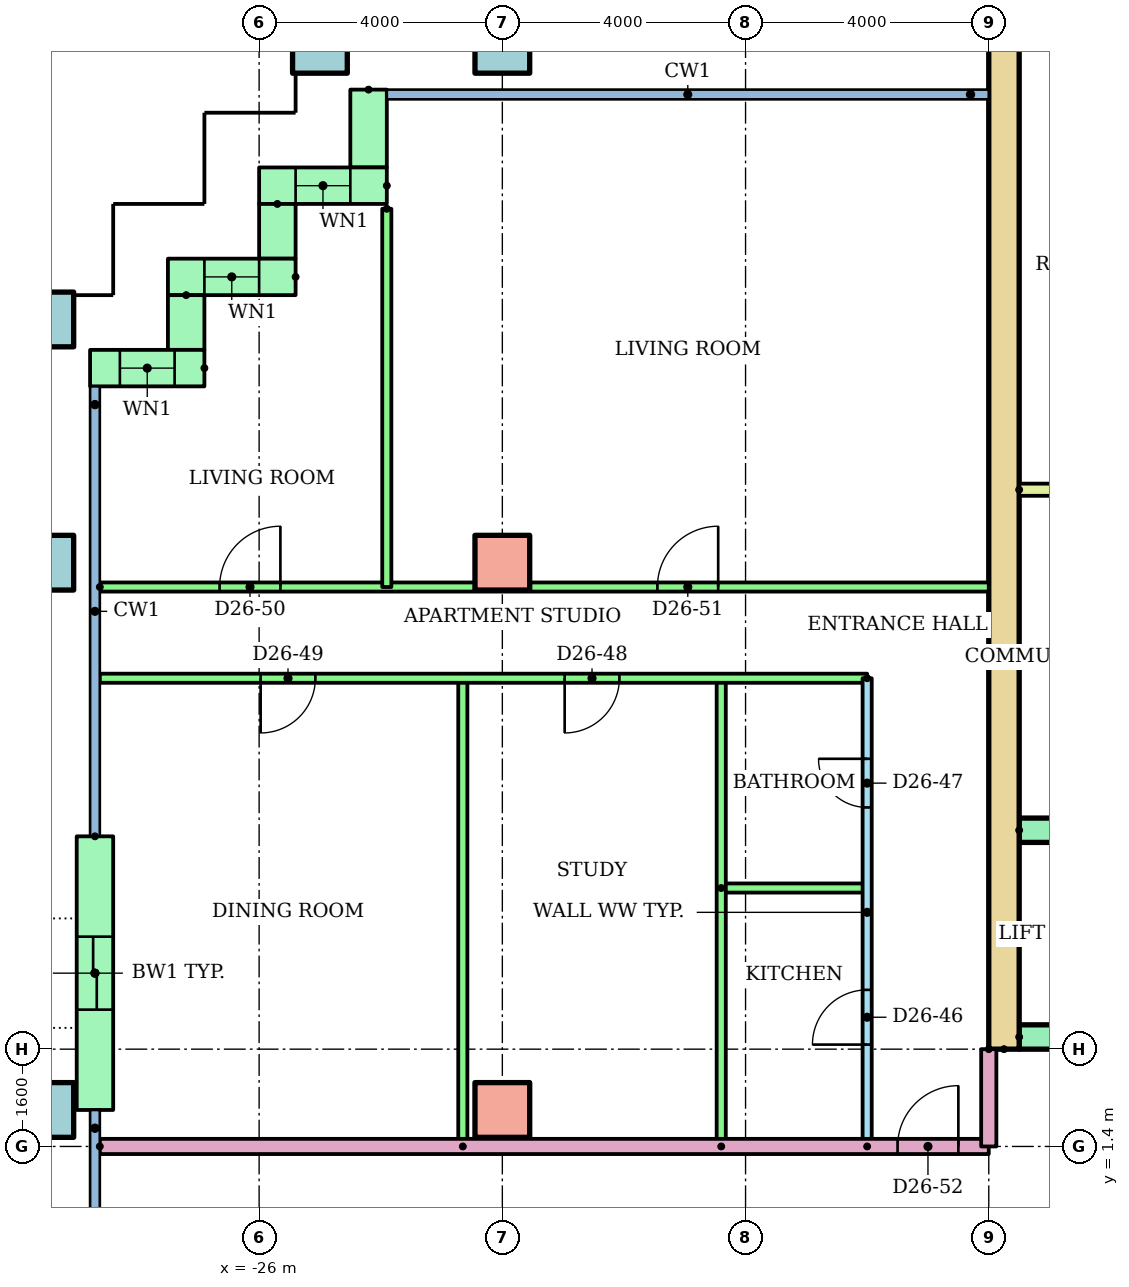
"""IFC4 building model, lengths in metres.
Left out: names, types, materials, properties, quantities, classifications, styles, units other than length and angle.
Written with IfcOpenShell. Run it as: python <this file> out.ifc"""

import sys

from ifc_helpers import new_model, si_unit, direction, frame, frame_2d, origin, origin_2d, place, context, subcontext, project, spatial, rectangle, hollow_rectangle, extrude, element, fill, save


model = new_model("IFC4")
c1 = context("Model", 3, precision=1e-05, world=origin(), true_north=direction((0.0, 1.0)))
c2 = subcontext(c1, "Body", "Model", "MODEL_VIEW")
j1 = project(units=[si_unit("LENGTHUNIT", "METRE"), si_unit("PLANEANGLEUNIT", "RADIAN")], contexts=[c1])
p1 = place(None, origin())
s1 = spatial("IfcSite", under=j1, at=p1, CompositionType="ELEMENT")
p2 = place(p1, origin())
s2 = spatial("IfcBuilding", under=s1, at=p2, CompositionType="ELEMENT")
p3 = place(p2, frame((0.0, 0.0, 99.9)))
s3 = spatial("IfcBuildingStorey", under=s2, at=p3, CompositionType="ELEMENT", Elevation=99.9)
p4 = place(p3, frame((-29.5, 2.0, 0.0)))
e1 = element("IfcColumn", 1, at=p4, inside=s3, PredefinedType="COLUMN", context=c2, shape_type="SweptSolid", body=[
    extrude(hollow_rectangle(XDim=0.9, YDim=0.9, WallThickness=0.045, at=origin_2d()), origin(), (0.0, 0.0, 1.0), 3.2),
])
p5 = place(p3, frame((-22.0, 2.0, 0.0)))
e2 = element("IfcColumn", 2, at=p5, inside=s3, PredefinedType="COLUMN", context=c2, shape_type="SweptSolid", body=[
    extrude(rectangle(XDim=0.9, YDim=0.9, at=origin_2d()), origin(), (0.0, 0.0, 1.0), 3.2),
])
p6 = place(p3, frame((-29.5, 11.0, 0.0)))
e3 = element("IfcColumn", 3, at=p6, inside=s3, PredefinedType="COLUMN", context=c2, shape_type="SweptSolid", body=[
    extrude(hollow_rectangle(XDim=0.9, YDim=0.9, WallThickness=0.045, at=origin_2d()), origin(), (0.0, 0.0, 1.0), 3.2),
])
p7 = place(p3, frame((-22.0, 11.0, 0.0)))
e4 = element("IfcColumn", 4, at=p7, inside=s3, PredefinedType="COLUMN", context=c2, shape_type="SweptSolid", body=[
    extrude(rectangle(XDim=0.9, YDim=0.9, at=origin_2d()), origin(), (0.0, 0.0, 1.0), 3.2),
])
for number, where in (
    (5, (-29.5, 15.0, 0.0)),
    (6, (-25.0, 19.5, 0.0)),
    (7, (-22.0, 19.5, 0.0)),
):
    element("IfcColumn", number, at=place(p3, frame(where)), inside=s3, PredefinedType="COLUMN", context=c2, shape_type="SweptSolid", body=[
        extrude(hollow_rectangle(XDim=0.9, YDim=0.9, WallThickness=0.045, at=origin_2d()), origin(), (0.0, 0.0, 1.0), 3.2),
    ])
p8 = place(p3, frame((-24.2, 18.78, 0.0), z_axis=(0.0, 0.0, 1.0), x_axis=(0.0, -1.0, 0.0)))
e8 = element("IfcWall", 8, at=p8, inside=s3, PredefinedType="STANDARD", context=c2, shape_type="SweptSolid", body=[
    extrude(rectangle(XDim=1.28, YDim=0.6, at=frame_2d((0.64, 0.0))), origin(), (0.0, 0.0, 1.0), 2.92),
])
p9 = place(p3, frame((-23.9, 17.2, 0.0), z_axis=(0.0, 0.0, 1.0), x_axis=(-1.0, 0.0, 0.0)))
e9 = element("IfcWall", 9, at=p9, inside=s3, PredefinedType="STANDARD", context=c2, shape_type="SweptSolid", body=[
    extrude(rectangle(XDim=2.1, YDim=0.6, at=frame_2d((1.05, 0.0))), origin(), (0.0, 0.0, 1.0), 2.92),
])
p10 = place(p9, frame((0.6, 0.0, 0.9)))
e10 = element("IfcOpeningElement", 10, at=p10, cuts=e9, PredefinedType="OPENING", context=c2, shape_type="SweptSolid", body=[
    extrude(rectangle(XDim=0.9, YDim=1.5, at=frame_2d((0.45, 0.75))), frame((0.0, 0.31, 0.0), z_axis=(0.0, -1.0, 0.0), x_axis=(1.0, 0.0, 0.0)), (0.0, 0.0, 1.0), 0.62),
])
p11 = place(p3, frame((-25.7, 16.9, 0.0), z_axis=(0.0, 0.0, 1.0), x_axis=(0.0, -1.0, 0.0)))
e11 = element("IfcWall", 11, at=p11, inside=s3, PredefinedType="STANDARD", context=c2, shape_type="SweptSolid", body=[
    extrude(rectangle(XDim=0.9, YDim=0.6, at=frame_2d((0.45, 0.0))), origin(), (0.0, 0.0, 1.0), 2.92),
])
p12 = place(p3, frame((-25.4, 15.7, 0.0), z_axis=(0.0, 0.0, 1.0), x_axis=(-1.0, 0.0, 0.0)))
e12 = element("IfcWall", 12, at=p12, inside=s3, PredefinedType="STANDARD", context=c2, shape_type="SweptSolid", body=[
    extrude(rectangle(XDim=2.1, YDim=0.6, at=frame_2d((1.05, 0.0))), origin(), (0.0, 0.0, 1.0), 2.92),
])
p13 = place(p12, frame((0.6, 0.0, 0.9)))
e13 = element("IfcOpeningElement", 13, at=p13, cuts=e12, PredefinedType="OPENING", context=c2, shape_type="SweptSolid", body=[
    extrude(rectangle(XDim=0.9, YDim=1.5, at=frame_2d((0.45, 0.75))), frame((0.0, 0.31, 0.0), z_axis=(0.0, -1.0, 0.0), x_axis=(1.0, 0.0, 0.0)), (0.0, 0.0, 1.0), 0.62),
])
p14 = place(p3, frame((-27.2, 15.4, 0.0), z_axis=(0.0, 0.0, 1.0), x_axis=(0.0, -1.0, 0.0)))
e14 = element("IfcWall", 14, at=p14, inside=s3, PredefinedType="STANDARD", context=c2, shape_type="SweptSolid", body=[
    extrude(rectangle(XDim=0.9, YDim=0.6, at=frame_2d((0.45, 0.0))), origin(), (0.0, 0.0, 1.0), 2.92),
])
p15 = place(p3, frame((-26.9, 14.2, 0.0), z_axis=(0.0, 0.0, 1.0), x_axis=(-1.0, 0.0, 0.0)))
e15 = element("IfcWall", 15, at=p15, inside=s3, PredefinedType="STANDARD", context=c2, shape_type="SweptSolid", body=[
    extrude(rectangle(XDim=1.88, YDim=0.6, at=frame_2d((0.94, 0.0))), origin(), (0.0, 0.0, 1.0), 2.92),
])
p16 = place(p15, frame((0.49, 0.0, 0.9)))
e16 = element("IfcOpeningElement", 16, at=p16, cuts=e15, PredefinedType="OPENING", context=c2, shape_type="SweptSolid", body=[
    extrude(rectangle(XDim=0.9, YDim=1.5, at=frame_2d((0.45, 0.75))), frame((0.0, 0.31, 0.0), z_axis=(0.0, -1.0, 0.0), x_axis=(1.0, 0.0, 0.0)), (0.0, 0.0, 1.0), 0.62),
])
p17 = place(p3, frame((-28.7, 6.5, 0.0), z_axis=(0.0, 0.0, 1.0), x_axis=(0.0, -1.0, 0.0)))
e17 = element("IfcWall", 17, at=p17, inside=s3, PredefinedType="STANDARD", context=c2, shape_type="SweptSolid", body=[
    extrude(rectangle(XDim=4.5, YDim=0.6, at=frame_2d((2.25, 0.0))), origin(), (0.0, 0.0, 1.0), 2.92),
])
p18 = place(p17, frame((1.65, 0.0, 0.0)))
e18 = element("IfcOpeningElement", 18, at=p18, cuts=e17, PredefinedType="OPENING", context=c2, shape_type="SweptSolid", body=[
    extrude(rectangle(XDim=1.2, YDim=2.1, at=frame_2d((0.6, 1.05))), frame((0.0, 0.31, 0.0), z_axis=(0.0, -1.0, 0.0), x_axis=(1.0, 0.0, 0.0)), (0.0, 0.0, 1.0), 0.62),
])
p19 = place(p3, frame((-13.75, 3.0, 0.0), z_axis=(0.0, 0.0, 1.0), x_axis=(0.0, 1.0, 0.0)))
e19 = element("IfcWall", 19, at=p19, inside=s3, PredefinedType="SHEAR", context=c2, shape_type="SweptSolid", body=[
    extrude(rectangle(XDim=17.0, YDim=0.5, at=frame_2d((8.5, 0.0))), origin(), (0.0, 0.0, 1.0), 2.92),
])
p20 = place(p3, frame((-13.5, 3.2, 0.0)))
e20 = element("IfcWall", 20, at=p20, inside=s3, PredefinedType="SHEAR", context=c2, shape_type="SweptSolid", body=[
    extrude(rectangle(XDim=27.0, YDim=0.4, at=frame_2d((13.5, 0.0))), origin(), (0.0, 0.0, 1.0), 2.92),
])
p21 = place(p20, frame((6.861, 0.0, 0.0)))
e21 = element("IfcOpeningElement", 21, at=p21, cuts=e20, PredefinedType="OPENING", context=c2, shape_type="SweptSolid", body=[
    extrude(rectangle(XDim=1.1, YDim=2.1, at=frame_2d((0.55, 1.05))), frame((0.0, 0.21, 0.0), z_axis=(0.0, -1.0, 0.0), x_axis=(1.0, 0.0, 0.0)), (0.0, 0.0, 1.0), 0.42),
])
p22 = place(p20, frame((9.906, 0.0, 0.0)))
e22 = element("IfcOpeningElement", 22, at=p22, cuts=e20, PredefinedType="OPENING", context=c2, shape_type="SweptSolid", body=[
    extrude(rectangle(XDim=1.1, YDim=2.1, at=frame_2d((0.55, 1.05))), frame((0.0, 0.21, 0.0), z_axis=(0.0, -1.0, 0.0), x_axis=(1.0, 0.0, 0.0)), (0.0, 0.0, 1.0), 0.42),
])
p23 = place(p20, frame((15.994, 0.0, 0.0)))
e23 = element("IfcOpeningElement", 23, at=p23, cuts=e20, PredefinedType="OPENING", context=c2, shape_type="SweptSolid", body=[
    extrude(rectangle(XDim=1.1, YDim=2.1, at=frame_2d((0.55, 1.05))), frame((0.0, 0.21, 0.0), z_axis=(0.0, -1.0, 0.0), x_axis=(1.0, 0.0, 0.0)), (0.0, 0.0, 1.0), 0.42),
])
p24 = place(p20, frame((19.039, 0.0, 0.0)))
e24 = element("IfcOpeningElement", 24, at=p24, cuts=e20, PredefinedType="OPENING", context=c2, shape_type="SweptSolid", body=[
    extrude(rectangle(XDim=1.1, YDim=2.1, at=frame_2d((0.55, 1.05))), frame((0.0, 0.21, 0.0), z_axis=(0.0, -1.0, 0.0), x_axis=(1.0, 0.0, 0.0)), (0.0, 0.0, 1.0), 0.42),
])
p25 = place(p20, frame((12.6, 0.0, 0.0)))
e25 = element("IfcOpeningElement", 25, at=p25, cuts=e20, PredefinedType="OPENING", context=c2, shape_type="SweptSolid", body=[
    extrude(rectangle(XDim=1.8, YDim=2.1, at=frame_2d((0.9, 1.05))), frame((0.0, 0.21, 0.0), z_axis=(0.0, -1.0, 0.0), x_axis=(1.0, 0.0, 0.0)), (0.0, 0.0, 1.0), 0.42),
])
p26 = place(p3, frame((-13.5, 6.6, 0.0)))
e26 = element("IfcWall", 26, at=p26, inside=s3, PredefinedType="SHEAR", context=c2, shape_type="SweptSolid", body=[
    extrude(rectangle(XDim=11.978, YDim=0.4, at=frame_2d((5.989, 0.0))), origin(), (0.0, 0.0, 1.0), 2.92),
])
p27 = place(p3, frame((-13.5, 12.2, 0.0)))
e27 = element("IfcWall", 27, at=p27, inside=s3, PredefinedType="PARTITIONING", context=c2, shape_type="SweptSolid", body=[
    extrude(rectangle(XDim=3.9, YDim=0.2, at=frame_2d((1.95, 0.0))), origin(), (0.0, 0.0, 1.0), 2.92),
])
p28 = place(p3, frame((-16.0, 1.4, 0.0), z_axis=(0.0, 0.0, 1.0), x_axis=(0.0, 1.0, 0.0)))
e28 = element("IfcWall", 28, at=p28, inside=s3, PredefinedType="PARTITIONING", context=c2, shape_type="SweptSolid", body=[
    extrude(rectangle(XDim=7.7, YDim=0.15, at=frame_2d((3.85, 0.0))), origin(), (0.0, 0.0, 1.0), 2.4),
])
p29 = place(p28, frame((1.675, 0.0, 0.0)))
e29 = element("IfcOpeningElement", 29, at=p29, cuts=e28, PredefinedType="OPENING", context=c2, shape_type="SweptSolid", body=[
    extrude(rectangle(XDim=0.9, YDim=2.1, at=frame_2d((0.45, 1.05))), frame((0.0, 0.085, 0.0), z_axis=(0.0, -1.0, 0.0), x_axis=(1.0, 0.0, 0.0)), (0.0, 0.0, 1.0), 0.17),
])
p30 = place(p28, frame((5.575, 0.0, 0.0)))
e30 = element("IfcOpeningElement", 30, at=p30, cuts=e28, PredefinedType="OPENING", context=c2, shape_type="SweptSolid", body=[
    extrude(rectangle(XDim=0.8, YDim=2.1, at=frame_2d((0.4, 1.05))), frame((0.0, 0.085, 0.0), z_axis=(0.0, -1.0, 0.0), x_axis=(1.0, 0.0, 0.0)), (0.0, 0.0, 1.0), 0.17),
])
p31 = place(p3, frame((-18.4, 5.65, 0.0)))
e31 = element("IfcWall", 31, at=p31, inside=s3, PredefinedType="PARTITIONING", context=c2, shape_type="SweptSolid", body=[
    extrude(rectangle(XDim=2.4, YDim=0.15, at=frame_2d((1.2, 0.0))), origin(), (0.0, 0.0, 1.0), 2.4),
])
for number, where, z_axis, x_axis in (
    (32, (-18.4, 1.4, 0.0), (0.0, 0.0, 1.0), (0.0, 1.0, 0.0)),
    (33, (-22.65, 1.4, 0.0), (0.0, 0.0, 1.0), (0.0, 1.0, 0.0)),
):
    element("IfcWall", number, at=place(p3, frame(where, z_axis=z_axis, x_axis=x_axis)), inside=s3, PredefinedType="PARTITIONING", context=c2, shape_type="SweptSolid", body=[
        extrude(rectangle(XDim=7.7, YDim=0.15, at=frame_2d((3.85, 0.0))), origin(), (0.0, 0.0, 1.0), 2.4),
    ])
p32 = place(p3, frame((-16.0, 9.1, 0.0), z_axis=(0.0, 0.0, 1.0), x_axis=(-1.0, 0.0, 0.0)))
e34 = element("IfcWall", 34, at=p32, inside=s3, PredefinedType="PARTITIONING", context=c2, shape_type="SweptSolid", body=[
    extrude(rectangle(XDim=12.62, YDim=0.15, at=frame_2d((6.31, 0.0))), origin(), (0.0, 0.0, 1.0), 2.4),
])
p33 = place(p32, frame((4.075, 0.0, 0.0)))
e35 = element("IfcOpeningElement", 35, at=p33, cuts=e34, PredefinedType="OPENING", context=c2, shape_type="SweptSolid", body=[
    extrude(rectangle(XDim=0.9, YDim=2.1, at=frame_2d((0.45, 1.05))), frame((0.0, 0.085, 0.0), z_axis=(0.0, -1.0, 0.0), x_axis=(1.0, 0.0, 0.0)), (0.0, 0.0, 1.0), 0.17),
])
p34 = place(p32, frame((9.075, 0.0, 0.0)))
e36 = element("IfcOpeningElement", 36, at=p34, cuts=e34, PredefinedType="OPENING", context=c2, shape_type="SweptSolid", body=[
    extrude(rectangle(XDim=0.9, YDim=2.1, at=frame_2d((0.45, 1.05))), frame((0.0, 0.085, 0.0), z_axis=(0.0, -1.0, 0.0), x_axis=(1.0, 0.0, 0.0)), (0.0, 0.0, 1.0), 0.17),
])
p35 = place(p3, frame((-28.62, 10.6, 0.0)))
e37 = element("IfcWall", 37, at=p35, inside=s3, PredefinedType="PARTITIONING", context=c2, shape_type="SweptSolid", body=[
    extrude(rectangle(XDim=14.62, YDim=0.15, at=frame_2d((7.31, 0.0))), origin(), (0.0, 0.0, 1.0), 2.4),
])
p36 = place(p35, frame((1.97, 0.0, 0.0)))
e38 = element("IfcOpeningElement", 38, at=p36, cuts=e37, PredefinedType="OPENING", context=c2, shape_type="SweptSolid", body=[
    extrude(rectangle(XDim=1.0, YDim=2.1, at=frame_2d((0.5, 1.05))), frame((0.0, 0.085, 0.0), z_axis=(0.0, -1.0, 0.0), x_axis=(1.0, 0.0, 0.0)), (0.0, 0.0, 1.0), 0.17),
])
p37 = place(p35, frame((9.17, 0.0, 0.0)))
e39 = element("IfcOpeningElement", 39, at=p37, cuts=e37, PredefinedType="OPENING", context=c2, shape_type="SweptSolid", body=[
    extrude(rectangle(XDim=1.0, YDim=2.1, at=frame_2d((0.5, 1.05))), frame((0.0, 0.085, 0.0), z_axis=(0.0, -1.0, 0.0), x_axis=(1.0, 0.0, 0.0)), (0.0, 0.0, 1.0), 0.17),
])
p38 = place(p3, frame((-23.9, 16.82, 0.0), z_axis=(0.0, 0.0, 1.0), x_axis=(0.0, -1.0, 0.0)))
e40 = element("IfcWall", 40, at=p38, inside=s3, PredefinedType="PARTITIONING", context=c2, shape_type="SweptSolid", body=[
    extrude(rectangle(XDim=6.22, YDim=0.15, at=frame_2d((3.11, 0.0))), origin(), (0.0, 0.0, 1.0), 2.4),
])
p39 = place(p3, frame((-28.62, 1.4, 0.0)))
e41 = element("IfcWall", 41, at=p39, inside=s3, PredefinedType="PARTITIONING", context=c2, shape_type="SweptSolid", body=[
    extrude(rectangle(XDim=14.62, YDim=0.25, at=frame_2d((7.31, 0.0))), origin(), (0.0, 0.0, 1.0), 2.4),
])
p40 = place(p39, frame((13.12, 0.0, 0.0)))
e42 = element("IfcOpeningElement", 42, at=p40, cuts=e41, PredefinedType="OPENING", context=c2, shape_type="SweptSolid", body=[
    extrude(rectangle(XDim=1.0, YDim=2.1, at=frame_2d((0.5, 1.05))), frame((0.0, 0.135, 0.0), z_axis=(0.0, -1.0, 0.0), x_axis=(1.0, 0.0, 0.0)), (0.0, 0.0, 1.0), 0.27),
])
p41 = place(p3, frame((-14.0, 3.0, 0.0), z_axis=(0.0, 0.0, 1.0), x_axis=(0.0, -1.0, 0.0)))
e43 = element("IfcWall", 43, at=p41, inside=s3, PredefinedType="PARTITIONING", context=c2, shape_type="SweptSolid", body=[
    extrude(rectangle(XDim=1.6, YDim=0.25, at=frame_2d((0.8, 0.0))), origin(), (0.0, 0.0, 1.0), 2.4),
])
p42 = place(p10, origin())
e44 = element("IfcWindow", 44, at=p42, inside=s3, PartitioningType="SINGLE_PANEL", PredefinedType="WINDOW", context=c2, shape_type="SweptSolid", body=[
    extrude(rectangle(XDim=0.9, YDim=1.5, at=frame_2d((0.45, 0.75))), frame((0.0, 0.03, 0.0), z_axis=(0.0, -1.0, 0.0), x_axis=(1.0, 0.0, 0.0)), (0.0, 0.0, 1.0), 0.06),
])
fill(e10, e44)
p43 = place(p13, origin())
e45 = element("IfcWindow", 45, at=p43, inside=s3, PartitioningType="SINGLE_PANEL", PredefinedType="WINDOW", context=c2, shape_type="SweptSolid", body=[
    extrude(rectangle(XDim=0.9, YDim=1.5, at=frame_2d((0.45, 0.75))), frame((0.0, 0.03, 0.0), z_axis=(0.0, -1.0, 0.0), x_axis=(1.0, 0.0, 0.0)), (0.0, 0.0, 1.0), 0.06),
])
fill(e13, e45)
p44 = place(p16, origin())
e46 = element("IfcWindow", 46, at=p44, inside=s3, PartitioningType="SINGLE_PANEL", PredefinedType="WINDOW", context=c2, shape_type="SweptSolid", body=[
    extrude(rectangle(XDim=0.9, YDim=1.5, at=frame_2d((0.45, 0.75))), frame((0.0, 0.03, 0.0), z_axis=(0.0, -1.0, 0.0), x_axis=(1.0, 0.0, 0.0)), (0.0, 0.0, 1.0), 0.06),
])
fill(e16, e46)
p45 = place(p29, origin())
e47 = element("IfcDoor", 47, at=p45, inside=s3, OperationType="SINGLE_SWING_LEFT", PredefinedType="DOOR", context=c2, shape_type="SweptSolid", body=[
    extrude(rectangle(XDim=0.9, YDim=2.1, at=frame_2d((0.45, 1.05))), frame((0.0, 0.025, 0.0), z_axis=(0.0, -1.0, 0.0), x_axis=(1.0, 0.0, 0.0)), (0.0, 0.0, 1.0), 0.05),
])
fill(e29, e47)
p46 = place(p30, origin())
e48 = element("IfcDoor", 48, at=p46, inside=s3, OperationType="SINGLE_SWING_RIGHT", PredefinedType="DOOR", context=c2, shape_type="SweptSolid", body=[
    extrude(rectangle(XDim=0.8, YDim=2.1, at=frame_2d((0.4, 1.05))), frame((0.0, 0.025, 0.0), z_axis=(0.0, -1.0, 0.0), x_axis=(1.0, 0.0, 0.0)), (0.0, 0.0, 1.0), 0.05),
])
fill(e30, e48)
p47 = place(p33, origin())
e49 = element("IfcDoor", 49, at=p47, inside=s3, OperationType="SINGLE_SWING_RIGHT", PredefinedType="DOOR", context=c2, shape_type="SweptSolid", body=[
    extrude(rectangle(XDim=0.9, YDim=2.1, at=frame_2d((0.45, 1.05))), frame((0.0, 0.025, 0.0), z_axis=(0.0, -1.0, 0.0), x_axis=(1.0, 0.0, 0.0)), (0.0, 0.0, 1.0), 0.05),
])
fill(e35, e49)
p48 = place(p34, origin())
e50 = element("IfcDoor", 50, at=p48, inside=s3, OperationType="SINGLE_SWING_RIGHT", PredefinedType="DOOR", context=c2, shape_type="SweptSolid", body=[
    extrude(rectangle(XDim=0.9, YDim=2.1, at=frame_2d((0.45, 1.05))), frame((0.0, 0.025, 0.0), z_axis=(0.0, -1.0, 0.0), x_axis=(1.0, 0.0, 0.0)), (0.0, 0.0, 1.0), 0.05),
])
fill(e36, e50)
p49 = place(p36, origin())
e51 = element("IfcDoor", 51, at=p49, inside=s3, OperationType="SINGLE_SWING_RIGHT", PredefinedType="DOOR", context=c2, shape_type="SweptSolid", body=[
    extrude(rectangle(XDim=1.0, YDim=2.1, at=frame_2d((0.5, 1.05))), frame((0.0, 0.025, 0.0), z_axis=(0.0, -1.0, 0.0), x_axis=(1.0, 0.0, 0.0)), (0.0, 0.0, 1.0), 0.05),
])
fill(e38, e51)
p50 = place(p37, origin())
e52 = element("IfcDoor", 52, at=p50, inside=s3, OperationType="SINGLE_SWING_RIGHT", PredefinedType="DOOR", context=c2, shape_type="SweptSolid", body=[
    extrude(rectangle(XDim=1.0, YDim=2.1, at=frame_2d((0.5, 1.05))), frame((0.0, 0.025, 0.0), z_axis=(0.0, -1.0, 0.0), x_axis=(1.0, 0.0, 0.0)), (0.0, 0.0, 1.0), 0.05),
])
fill(e39, e52)
p51 = place(p40, origin())
e53 = element("IfcDoor", 53, at=p51, inside=s3, OperationType="SINGLE_SWING_RIGHT", PredefinedType="DOOR", context=c2, shape_type="SweptSolid", body=[
    extrude(rectangle(XDim=1.0, YDim=2.1, at=frame_2d((0.5, 1.05))), frame((0.0, 0.025, 0.0), z_axis=(0.0, -1.0, 0.0), x_axis=(1.0, 0.0, 0.0)), (0.0, 0.0, 1.0), 0.05),
])
fill(e42, e53)
p52 = place(p18, origin())
e54 = element("IfcDoor", 54, at=p52, inside=s3, OperationType="SLIDING_TO_LEFT", PredefinedType="DOOR", context=c2, shape_type="SweptSolid", body=[
    extrude(rectangle(XDim=1.2, YDim=2.1, at=frame_2d((0.6, 1.05))), frame((0.0, 0.025, 0.0), z_axis=(0.0, -1.0, 0.0), x_axis=(1.0, 0.0, 0.0)), (0.0, 0.0, 1.0), 0.05),
])
fill(e18, e54)
save(model, sys.argv[1])
